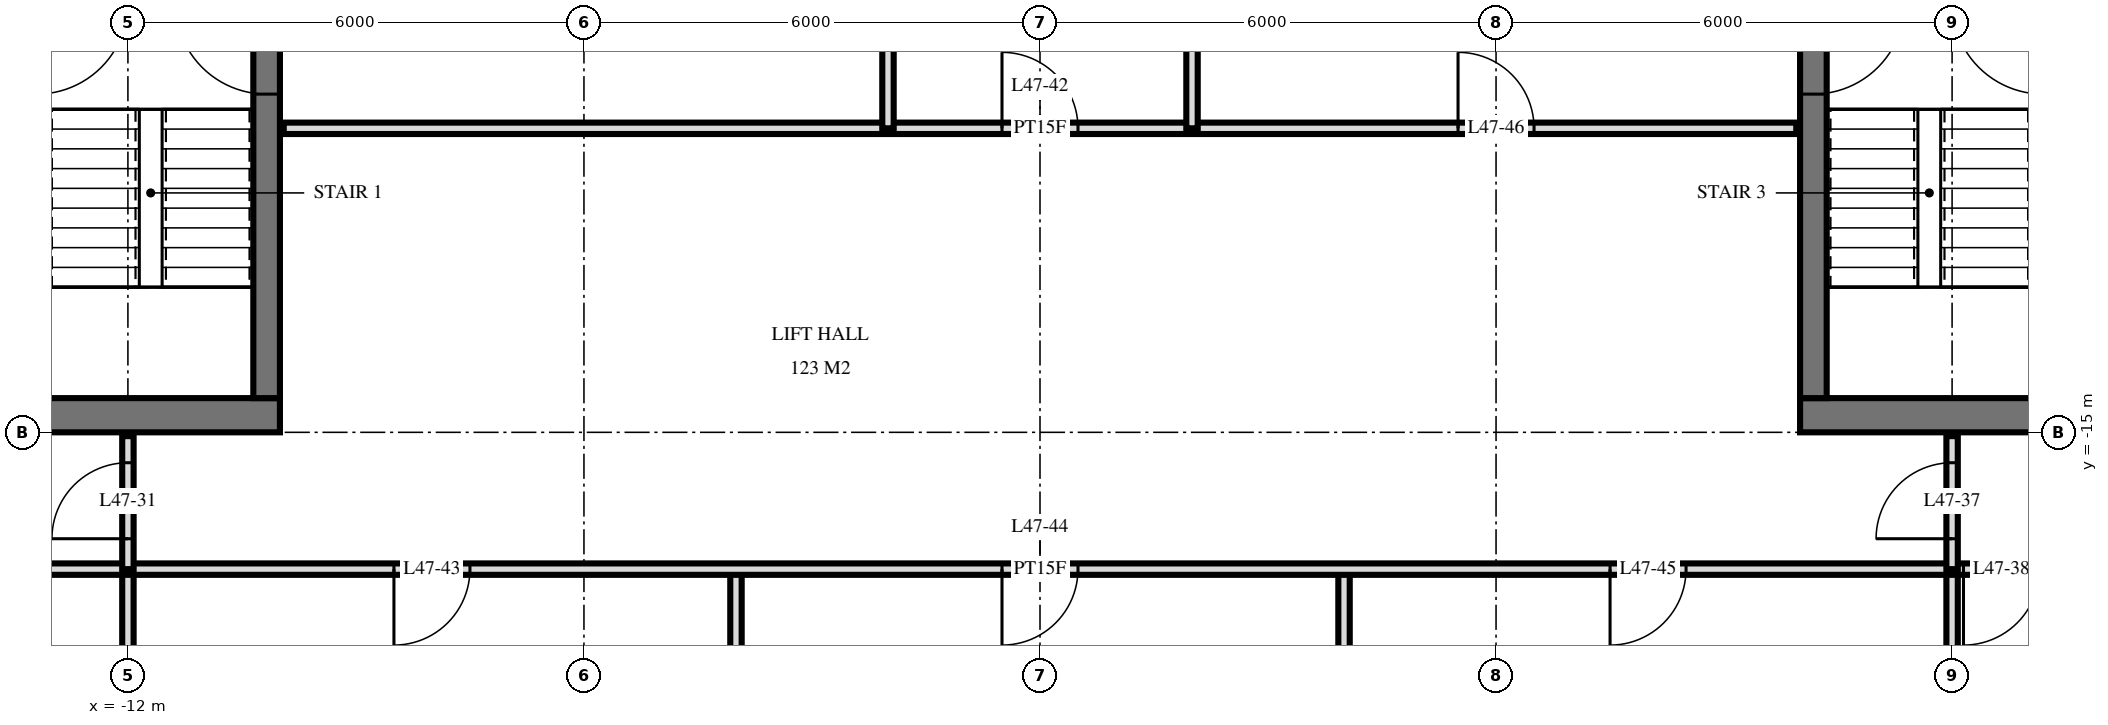
"""IFC4 building model, lengths in metres.
Left out: names, types, materials, properties, quantities, classifications, styles, units other than length and angle.
Written with IfcOpenShell. Run it as: python <this file> out.ifc"""

import sys

from ifc_helpers import new_model, si_unit, direction, frame, frame_2d, origin, place, context, subcontext, project, spatial, rectangle, extrude, element, fill, save


model = new_model("IFC4")
c1 = context("Model", 3, precision=1e-05, world=origin(), true_north=direction((0.0, 1.0)))
c2 = subcontext(c1, "Body", "Model", "MODEL_VIEW")
j1 = project(units=[si_unit("LENGTHUNIT", "METRE"), si_unit("PLANEANGLEUNIT", "RADIAN")], contexts=[c1])
p1 = place(None, origin())
s1 = spatial("IfcSite", under=j1, at=p1, CompositionType="ELEMENT")
p2 = place(p1, origin())
s2 = spatial("IfcBuilding", under=s1, at=p2, CompositionType="ELEMENT")
p3 = place(p2, frame((0.0, 0.0, 183.6)))
s3 = spatial("IfcBuildingStorey", under=s2, at=p3, CompositionType="ELEMENT", Elevation=183.6)
p4 = place(p3, frame((-24.5, -14.775, 0.0), z_axis=(0.0, 0.0, 1.0), x_axis=(1.0, 0.0, 0.0)))
e1 = element("IfcWall", 1, at=p4, inside=s3, PredefinedType="SHEAR", context=c2, shape_type="SweptSolid", body=[
    extrude(rectangle(XDim=14.5, YDim=0.45, at=frame_2d((7.25, 0.0))), origin(), (0.0, 0.0, 1.0), 3.5),
])
p5 = place(p4, frame((6.2, 0.0, 0.0)))
e2 = element("IfcOpeningElement", 2, at=p5, cuts=e1, PredefinedType="OPENING", context=c2, shape_type="SweptSolid", body=[
    extrude(rectangle(XDim=1.2, YDim=2.1, at=frame_2d((0.6, 1.05))), frame((0.0, 0.235, 0.0), z_axis=(0.0, -1.0, 0.0), x_axis=(1.0, 0.0, 0.0)), (0.0, 0.0, 1.0), 0.47),
])
p6 = place(p4, frame((9.25, 0.0, 0.0)))
e3 = element("IfcOpeningElement", 3, at=p6, cuts=e1, PredefinedType="OPENING", context=c2, shape_type="SweptSolid", body=[
    extrude(rectangle(XDim=1.1, YDim=2.1, at=frame_2d((0.55, 1.05))), frame((0.0, 0.235, 0.0), z_axis=(0.0, -1.0, 0.0), x_axis=(1.0, 0.0, 0.0)), (0.0, 0.0, 1.0), 0.47),
])
p7 = place(p4, frame((3.5, 0.0, 0.0)))
e4 = element("IfcOpeningElement", 4, at=p7, cuts=e1, PredefinedType="OPENING", context=c2, shape_type="SweptSolid", body=[
    extrude(rectangle(XDim=0.9, YDim=2.1, at=frame_2d((0.45, 1.05))), frame((0.0, 0.235, 0.0), z_axis=(0.0, -1.0, 0.0), x_axis=(1.0, 0.0, 0.0)), (0.0, 0.0, 1.0), 0.47),
])
p8 = place(p4, frame((1.05, 0.0, 0.0)))
e5 = element("IfcOpeningElement", 5, at=p8, cuts=e1, PredefinedType="OPENING", context=c2, shape_type="SweptSolid", body=[
    extrude(rectangle(XDim=1.0, YDim=2.1, at=frame_2d((0.5, 1.05))), frame((0.0, 0.235, 0.0), z_axis=(0.0, -1.0, 0.0), x_axis=(1.0, 0.0, 0.0)), (0.0, 0.0, 1.0), 0.47),
])
p9 = place(p3, frame((-10.175, -14.55, 0.0), z_axis=(0.0, 0.0, 1.0), x_axis=(0.0, 1.0, 0.0)))
e6 = element("IfcWall", 6, at=p9, inside=s3, PredefinedType="SHEAR", context=c2, shape_type="SweptSolid", body=[
    extrude(rectangle(XDim=14.1, YDim=0.35, at=frame_2d((7.05, 0.0))), origin(), (0.0, 0.0, 1.0), 3.5),
])
p10 = place(p9, frame((8.4, 0.0, 0.0)))
e7 = element("IfcOpeningElement", 7, at=p10, cuts=e6, PredefinedType="OPENING", context=c2, shape_type="SweptSolid", body=[
    extrude(rectangle(XDim=1.4, YDim=2.4, at=frame_2d((0.7, 1.2))), frame((0.0, 0.185, 0.0), z_axis=(0.0, -1.0, 0.0), x_axis=(1.0, 0.0, 0.0)), (0.0, 0.0, 1.0), 0.37),
])
p11 = place(p9, frame((10.0, 0.0, 0.0)))
e8 = element("IfcOpeningElement", 8, at=p11, cuts=e6, PredefinedType="OPENING", context=c2, shape_type="SweptSolid", body=[
    extrude(rectangle(XDim=1.4, YDim=2.4, at=frame_2d((0.7, 1.2))), frame((0.0, 0.185, 0.0), z_axis=(0.0, -1.0, 0.0), x_axis=(1.0, 0.0, 0.0)), (0.0, 0.0, 1.0), 0.37),
])
p12 = place(p9, frame((4.0, 0.0, 0.0)))
e9 = element("IfcOpeningElement", 9, at=p12, cuts=e6, PredefinedType="OPENING", context=c2, shape_type="SweptSolid", body=[
    extrude(rectangle(XDim=1.2, YDim=2.1, at=frame_2d((0.6, 1.05))), frame((0.0, 0.185, 0.0), z_axis=(0.0, -1.0, 0.0), x_axis=(1.0, 0.0, 0.0)), (0.0, 0.0, 1.0), 0.37),
])
p13 = place(p3, frame((10.0, -14.775, 0.0), z_axis=(0.0, 0.0, 1.0), x_axis=(1.0, 0.0, 0.0)))
e10 = element("IfcWall", 10, at=p13, inside=s3, PredefinedType="SHEAR", context=c2, shape_type="SweptSolid", body=[
    extrude(rectangle(XDim=14.5, YDim=0.45, at=frame_2d((7.25, 0.0))), origin(), (0.0, 0.0, 1.0), 3.5),
])
p14 = place(p13, frame((7.1, 0.0, 0.0)))
e11 = element("IfcOpeningElement", 11, at=p14, cuts=e10, PredefinedType="OPENING", context=c2, shape_type="SweptSolid", body=[
    extrude(rectangle(XDim=1.2, YDim=2.1, at=frame_2d((0.6, 1.05))), frame((0.0, 0.235, 0.0), z_axis=(0.0, -1.0, 0.0), x_axis=(1.0, 0.0, 0.0)), (0.0, 0.0, 1.0), 0.47),
])
p15 = place(p13, frame((4.15, 0.0, 0.0)))
e12 = element("IfcOpeningElement", 12, at=p15, cuts=e10, PredefinedType="OPENING", context=c2, shape_type="SweptSolid", body=[
    extrude(rectangle(XDim=1.1, YDim=2.1, at=frame_2d((0.55, 1.05))), frame((0.0, 0.235, 0.0), z_axis=(0.0, -1.0, 0.0), x_axis=(1.0, 0.0, 0.0)), (0.0, 0.0, 1.0), 0.47),
])
p16 = place(p13, frame((10.1, 0.0, 0.0)))
e13 = element("IfcOpeningElement", 13, at=p16, cuts=e10, PredefinedType="OPENING", context=c2, shape_type="SweptSolid", body=[
    extrude(rectangle(XDim=0.9, YDim=2.1, at=frame_2d((0.45, 1.05))), frame((0.0, 0.235, 0.0), z_axis=(0.0, -1.0, 0.0), x_axis=(1.0, 0.0, 0.0)), (0.0, 0.0, 1.0), 0.47),
])
p17 = place(p13, frame((12.45, 0.0, 0.0)))
e14 = element("IfcOpeningElement", 14, at=p17, cuts=e10, PredefinedType="OPENING", context=c2, shape_type="SweptSolid", body=[
    extrude(rectangle(XDim=1.0, YDim=2.1, at=frame_2d((0.5, 1.05))), frame((0.0, 0.235, 0.0), z_axis=(0.0, -1.0, 0.0), x_axis=(1.0, 0.0, 0.0)), (0.0, 0.0, 1.0), 0.47),
])
p18 = place(p3, frame((10.175, -14.55, 0.0), z_axis=(0.0, 0.0, 1.0), x_axis=(0.0, 1.0, 0.0)))
e15 = element("IfcWall", 15, at=p18, inside=s3, PredefinedType="SHEAR", context=c2, shape_type="SweptSolid", body=[
    extrude(rectangle(XDim=14.1, YDim=0.35, at=frame_2d((7.05, 0.0))), origin(), (0.0, 0.0, 1.0), 3.5),
])
p19 = place(p18, frame((8.4, 0.0, 0.0)))
e16 = element("IfcOpeningElement", 16, at=p19, cuts=e15, PredefinedType="OPENING", context=c2, shape_type="SweptSolid", body=[
    extrude(rectangle(XDim=1.4, YDim=2.4, at=frame_2d((0.7, 1.2))), frame((0.0, 0.185, 0.0), z_axis=(0.0, -1.0, 0.0), x_axis=(1.0, 0.0, 0.0)), (0.0, 0.0, 1.0), 0.37),
])
p20 = place(p18, frame((10.0, 0.0, 0.0)))
e17 = element("IfcOpeningElement", 17, at=p20, cuts=e15, PredefinedType="OPENING", context=c2, shape_type="SweptSolid", body=[
    extrude(rectangle(XDim=1.4, YDim=2.4, at=frame_2d((0.7, 1.2))), frame((0.0, 0.185, 0.0), z_axis=(0.0, -1.0, 0.0), x_axis=(1.0, 0.0, 0.0)), (0.0, 0.0, 1.0), 0.37),
])
p21 = place(p18, frame((4.0, 0.0, 0.0)))
e18 = element("IfcOpeningElement", 18, at=p21, cuts=e15, PredefinedType="OPENING", context=c2, shape_type="SweptSolid", body=[
    extrude(rectangle(XDim=1.2, YDim=2.1, at=frame_2d((0.6, 1.05))), frame((0.0, 0.185, 0.0), z_axis=(0.0, -1.0, 0.0), x_axis=(1.0, 0.0, 0.0)), (0.0, 0.0, 1.0), 0.37),
])
p22 = place(p3, frame((12.0, -16.8, 0.0), z_axis=(0.0, 0.0, 1.0), x_axis=(0.0, 1.0, 0.0)))
e19 = element("IfcWall", 19, at=p22, inside=s3, PredefinedType="PARTITIONING", context=c2, shape_type="SweptSolid", body=[
    extrude(rectangle(XDim=1.75, YDim=0.15, at=frame_2d((0.875, 0.0))), origin(), (0.0, 0.0, 1.0), 3.22),
])
p23 = place(p22, frame((0.4, 0.0, 0.0)))
e20 = element("IfcOpeningElement", 20, at=p23, cuts=e19, PredefinedType="OPENING", context=c2, shape_type="SweptSolid", body=[
    extrude(rectangle(XDim=1.0, YDim=2.1, at=frame_2d((0.5, 1.05))), frame((0.0, 0.085, 0.0), z_axis=(0.0, -1.0, 0.0), x_axis=(1.0, 0.0, 0.0)), (0.0, 0.0, 1.0), 0.17),
])
for number, where, z_axis, x_axis in (
    (21, (12.0, -29.22, 0.0), (0.0, 0.0, 1.0), (0.0, 1.0, 0.0)),
    (22, (4.0, -29.22, 0.0), (0.0, 0.0, 1.0), (0.0, 1.0, 0.0)),
):
    element("IfcWall", number, at=place(p3, frame(where, z_axis=z_axis, x_axis=x_axis)), inside=s3, PredefinedType="PARTITIONING", context=c2, shape_type="SweptSolid", body=[
        extrude(rectangle(XDim=12.42, YDim=0.15, at=frame_2d((6.21, 0.0))), origin(), (0.0, 0.0, 1.0), 3.22),
    ])
for number, where, z_axis, x_axis in (
    (23, (2.0, -11.0, 0.0), (0.0, 0.0, 1.0), (0.0, 1.0, 0.0)),
    (24, (-2.0, -11.0, 0.0), (0.0, 0.0, 1.0), (0.0, 1.0, 0.0)),
):
    element("IfcWall", number, at=place(p3, frame(where, z_axis=z_axis, x_axis=x_axis)), inside=s3, PredefinedType="PARTITIONING", context=c2, shape_type="SweptSolid", body=[
        extrude(rectangle(XDim=4.0, YDim=0.15, at=frame_2d((2.0, 0.0))), origin(), (0.0, 0.0, 1.0), 3.22),
    ])
p24 = place(p3, frame((-4.0, -29.22, 0.0), z_axis=(0.0, 0.0, 1.0), x_axis=(0.0, 1.0, 0.0)))
e25 = element("IfcWall", 25, at=p24, inside=s3, PredefinedType="PARTITIONING", context=c2, shape_type="SweptSolid", body=[
    extrude(rectangle(XDim=12.42, YDim=0.15, at=frame_2d((6.21, 0.0))), origin(), (0.0, 0.0, 1.0), 3.22),
])
p25 = place(p3, frame((-12.0, -16.8, 0.0), z_axis=(0.0, 0.0, 1.0), x_axis=(0.0, 1.0, 0.0)))
e26 = element("IfcWall", 26, at=p25, inside=s3, PredefinedType="PARTITIONING", context=c2, shape_type="SweptSolid", body=[
    extrude(rectangle(XDim=1.75, YDim=0.15, at=frame_2d((0.875, 0.0))), origin(), (0.0, 0.0, 1.0), 3.22),
])
p26 = place(p25, frame((0.4, 0.0, 0.0)))
e27 = element("IfcOpeningElement", 27, at=p26, cuts=e26, PredefinedType="OPENING", context=c2, shape_type="SweptSolid", body=[
    extrude(rectangle(XDim=1.0, YDim=2.1, at=frame_2d((0.5, 1.05))), frame((0.0, 0.085, 0.0), z_axis=(0.0, -1.0, 0.0), x_axis=(1.0, 0.0, 0.0)), (0.0, 0.0, 1.0), 0.17),
])
p27 = place(p3, frame((-12.0, -29.22, 0.0), z_axis=(0.0, 0.0, 1.0), x_axis=(0.0, 1.0, 0.0)))
e28 = element("IfcWall", 28, at=p27, inside=s3, PredefinedType="PARTITIONING", context=c2, shape_type="SweptSolid", body=[
    extrude(rectangle(XDim=12.42, YDim=0.15, at=frame_2d((6.21, 0.0))), origin(), (0.0, 0.0, 1.0), 3.22),
])
p28 = place(p3, frame((-26.82, -16.8, 0.0), z_axis=(0.0, 0.0, 1.0), x_axis=(1.0, 0.0, 0.0)))
e29 = element("IfcWall", 29, at=p28, inside=s3, PredefinedType="PARTITIONING", context=c2, shape_type="SweptSolid", body=[
    extrude(rectangle(XDim=53.64, YDim=0.15, at=frame_2d((26.82, 0.0))), origin(), (0.0, 0.0, 1.0), 3.22),
])
p29 = place(p28, frame((11.97, 0.0, 0.0)))
e30 = element("IfcOpeningElement", 30, at=p29, cuts=e29, PredefinedType="OPENING", context=c2, shape_type="SweptSolid", body=[
    extrude(rectangle(XDim=1.0, YDim=2.1, at=frame_2d((0.5, 1.05))), frame((0.0, 0.085, 0.0), z_axis=(0.0, -1.0, 0.0), x_axis=(1.0, 0.0, 0.0)), (0.0, 0.0, 1.0), 0.17),
])
p30 = place(p28, frame((10.67, 0.0, 0.0)))
e31 = element("IfcOpeningElement", 31, at=p30, cuts=e29, PredefinedType="OPENING", context=c2, shape_type="SweptSolid", body=[
    extrude(rectangle(XDim=1.0, YDim=2.1, at=frame_2d((0.5, 1.05))), frame((0.0, 0.085, 0.0), z_axis=(0.0, -1.0, 0.0), x_axis=(1.0, 0.0, 0.0)), (0.0, 0.0, 1.0), 0.17),
])
p31 = place(p28, frame((3.22, 0.0, 0.0)))
e32 = element("IfcOpeningElement", 32, at=p31, cuts=e29, PredefinedType="OPENING", context=c2, shape_type="SweptSolid", body=[
    extrude(rectangle(XDim=1.0, YDim=2.1, at=frame_2d((0.5, 1.05))), frame((0.0, 0.085, 0.0), z_axis=(0.0, -1.0, 0.0), x_axis=(1.0, 0.0, 0.0)), (0.0, 0.0, 1.0), 0.17),
])
p32 = place(p28, frame((5.02, 0.0, 0.0)))
e33 = element("IfcOpeningElement", 33, at=p32, cuts=e29, PredefinedType="OPENING", context=c2, shape_type="SweptSolid", body=[
    extrude(rectangle(XDim=1.0, YDim=2.1, at=frame_2d((0.5, 1.05))), frame((0.0, 0.085, 0.0), z_axis=(0.0, -1.0, 0.0), x_axis=(1.0, 0.0, 0.0)), (0.0, 0.0, 1.0), 0.17),
])
p33 = place(p28, frame((38.97, 0.0, 0.0)))
e34 = element("IfcOpeningElement", 34, at=p33, cuts=e29, PredefinedType="OPENING", context=c2, shape_type="SweptSolid", body=[
    extrude(rectangle(XDim=1.0, YDim=2.1, at=frame_2d((0.5, 1.05))), frame((0.0, 0.085, 0.0), z_axis=(0.0, -1.0, 0.0), x_axis=(1.0, 0.0, 0.0)), (0.0, 0.0, 1.0), 0.17),
])
p34 = place(p28, frame((48.72, 0.0, 0.0)))
e35 = element("IfcOpeningElement", 35, at=p34, cuts=e29, PredefinedType="OPENING", context=c2, shape_type="SweptSolid", body=[
    extrude(rectangle(XDim=1.0, YDim=2.1, at=frame_2d((0.5, 1.05))), frame((0.0, 0.085, 0.0), z_axis=(0.0, -1.0, 0.0), x_axis=(1.0, 0.0, 0.0)), (0.0, 0.0, 1.0), 0.17),
])
p35 = place(p28, frame((46.92, 0.0, 0.0)))
e36 = element("IfcOpeningElement", 36, at=p35, cuts=e29, PredefinedType="OPENING", context=c2, shape_type="SweptSolid", body=[
    extrude(rectangle(XDim=1.0, YDim=2.1, at=frame_2d((0.5, 1.05))), frame((0.0, 0.085, 0.0), z_axis=(0.0, -1.0, 0.0), x_axis=(1.0, 0.0, 0.0)), (0.0, 0.0, 1.0), 0.17),
])
p36 = place(p28, frame((18.32, 0.0, 0.0)))
e37 = element("IfcOpeningElement", 37, at=p36, cuts=e29, PredefinedType="OPENING", context=c2, shape_type="SweptSolid", body=[
    extrude(rectangle(XDim=1.0, YDim=2.1, at=frame_2d((0.5, 1.05))), frame((0.0, 0.085, 0.0), z_axis=(0.0, -1.0, 0.0), x_axis=(1.0, 0.0, 0.0)), (0.0, 0.0, 1.0), 0.17),
])
p37 = place(p28, frame((26.32, 0.0, 0.0)))
e38 = element("IfcOpeningElement", 38, at=p37, cuts=e29, PredefinedType="OPENING", context=c2, shape_type="SweptSolid", body=[
    extrude(rectangle(XDim=1.0, YDim=2.1, at=frame_2d((0.5, 1.05))), frame((0.0, 0.085, 0.0), z_axis=(0.0, -1.0, 0.0), x_axis=(1.0, 0.0, 0.0)), (0.0, 0.0, 1.0), 0.17),
])
p38 = place(p28, frame((34.32, 0.0, 0.0)))
e39 = element("IfcOpeningElement", 39, at=p38, cuts=e29, PredefinedType="OPENING", context=c2, shape_type="SweptSolid", body=[
    extrude(rectangle(XDim=1.0, YDim=2.1, at=frame_2d((0.5, 1.05))), frame((0.0, 0.085, 0.0), z_axis=(0.0, -1.0, 0.0), x_axis=(1.0, 0.0, 0.0)), (0.0, 0.0, 1.0), 0.17),
])
p39 = place(p3, frame((-9.95, -11.0, 0.0), z_axis=(0.0, 0.0, 1.0), x_axis=(1.0, 0.0, 0.0)))
e40 = element("IfcWall", 40, at=p39, inside=s3, PredefinedType="PARTITIONING", context=c2, shape_type="SweptSolid", body=[
    extrude(rectangle(XDim=19.9, YDim=0.15, at=frame_2d((9.95, 0.0))), origin(), (0.0, 0.0, 1.0), 3.22),
])
p40 = place(p39, frame((9.45, 0.0, 0.0)))
e41 = element("IfcOpeningElement", 41, at=p40, cuts=e40, PredefinedType="OPENING", context=c2, shape_type="SweptSolid", body=[
    extrude(rectangle(XDim=1.0, YDim=2.1, at=frame_2d((0.5, 1.05))), frame((0.0, 0.085, 0.0), z_axis=(0.0, -1.0, 0.0), x_axis=(1.0, 0.0, 0.0)), (0.0, 0.0, 1.0), 0.17),
])
p41 = place(p39, frame((15.45, 0.0, 0.0)))
e42 = element("IfcOpeningElement", 42, at=p41, cuts=e40, PredefinedType="OPENING", context=c2, shape_type="SweptSolid", body=[
    extrude(rectangle(XDim=1.0, YDim=2.1, at=frame_2d((0.5, 1.05))), frame((0.0, 0.085, 0.0), z_axis=(0.0, -1.0, 0.0), x_axis=(1.0, 0.0, 0.0)), (0.0, 0.0, 1.0), 0.17),
])
p42 = place(p12, origin())
e43 = element("IfcDoor", 43, at=p42, inside=s3, OperationType="SINGLE_SWING_LEFT", PredefinedType="DOOR", context=c2, shape_type="SweptSolid", body=[
    extrude(rectangle(XDim=1.2, YDim=2.1, at=frame_2d((0.6, 1.05))), frame((0.0, 0.025, 0.0), z_axis=(0.0, -1.0, 0.0), x_axis=(1.0, 0.0, 0.0)), (0.0, 0.0, 1.0), 0.05),
])
fill(e9, e43)
p43 = place(p21, frame((0.6, 0.0, 0.0), z_axis=(0.0, 0.0, 1.0), x_axis=(-1.0, 0.0, 0.0)))
e44 = element("IfcDoor", 44, at=p43, inside=s3, OperationType="SINGLE_SWING_RIGHT", PredefinedType="DOOR", context=c2, shape_type="SweptSolid", body=[
    extrude(rectangle(XDim=1.2, YDim=2.1, at=frame_2d((0.0, 1.05))), frame((0.0, -0.025, 0.0), z_axis=(0.0, 1.0, 0.0), x_axis=(-1.0, 0.0, 0.0)), (0.0, 0.0, 1.0), 0.05),
])
fill(e18, e44)
p44 = place(p26, origin())
e45 = element("IfcDoor", 45, at=p44, inside=s3, OperationType="SINGLE_SWING_RIGHT", PredefinedType="DOOR", context=c2, shape_type="SweptSolid", body=[
    extrude(rectangle(XDim=1.0, YDim=2.1, at=frame_2d((0.5, 1.05))), frame((0.0, 0.025, 0.0), z_axis=(0.0, -1.0, 0.0), x_axis=(1.0, 0.0, 0.0)), (0.0, 0.0, 1.0), 0.05),
])
fill(e27, e45)
p45 = place(p23, origin())
e46 = element("IfcDoor", 46, at=p45, inside=s3, OperationType="SINGLE_SWING_RIGHT", PredefinedType="DOOR", context=c2, shape_type="SweptSolid", body=[
    extrude(rectangle(XDim=1.0, YDim=2.1, at=frame_2d((0.5, 1.05))), frame((0.0, 0.025, 0.0), z_axis=(0.0, -1.0, 0.0), x_axis=(1.0, 0.0, 0.0)), (0.0, 0.0, 1.0), 0.05),
])
fill(e20, e46)
p46 = place(p33, frame((0.5, 0.0, 0.0), z_axis=(0.0, 0.0, 1.0), x_axis=(-1.0, 0.0, 0.0)))
e47 = element("IfcDoor", 47, at=p46, inside=s3, OperationType="SINGLE_SWING_LEFT", PredefinedType="DOOR", context=c2, shape_type="SweptSolid", body=[
    extrude(rectangle(XDim=1.0, YDim=2.1, at=frame_2d((0.0, 1.05))), frame((0.0, -0.025, 0.0), z_axis=(0.0, 1.0, 0.0), x_axis=(-1.0, 0.0, 0.0)), (0.0, 0.0, 1.0), 0.05),
])
fill(e34, e47)
p47 = place(p40, origin())
e48 = element("IfcDoor", 48, at=p47, inside=s3, OperationType="SINGLE_SWING_RIGHT", PredefinedType="DOOR", context=c2, shape_type="SweptSolid", body=[
    extrude(rectangle(XDim=1.0, YDim=2.1, at=frame_2d((0.5, 1.05))), frame((0.0, 0.025, 0.0), z_axis=(0.0, -1.0, 0.0), x_axis=(1.0, 0.0, 0.0)), (0.0, 0.0, 1.0), 0.05),
])
fill(e41, e48)
p48 = place(p36, frame((0.5, 0.0, 0.0), z_axis=(0.0, 0.0, 1.0), x_axis=(-1.0, 0.0, 0.0)))
e49 = element("IfcDoor", 49, at=p48, inside=s3, OperationType="SINGLE_SWING_LEFT", PredefinedType="DOOR", context=c2, shape_type="SweptSolid", body=[
    extrude(rectangle(XDim=1.0, YDim=2.1, at=frame_2d((0.0, 1.05))), frame((0.0, -0.025, 0.0), z_axis=(0.0, 1.0, 0.0), x_axis=(-1.0, 0.0, 0.0)), (0.0, 0.0, 1.0), 0.05),
])
fill(e37, e49)
p49 = place(p37, frame((0.5, 0.0, 0.0), z_axis=(0.0, 0.0, 1.0), x_axis=(-1.0, 0.0, 0.0)))
e50 = element("IfcDoor", 50, at=p49, inside=s3, OperationType="SINGLE_SWING_LEFT", PredefinedType="DOOR", context=c2, shape_type="SweptSolid", body=[
    extrude(rectangle(XDim=1.0, YDim=2.1, at=frame_2d((0.0, 1.05))), frame((0.0, -0.025, 0.0), z_axis=(0.0, 1.0, 0.0), x_axis=(-1.0, 0.0, 0.0)), (0.0, 0.0, 1.0), 0.05),
])
fill(e38, e50)
p50 = place(p38, frame((0.5, 0.0, 0.0), z_axis=(0.0, 0.0, 1.0), x_axis=(-1.0, 0.0, 0.0)))
e51 = element("IfcDoor", 51, at=p50, inside=s3, OperationType="SINGLE_SWING_LEFT", PredefinedType="DOOR", context=c2, shape_type="SweptSolid", body=[
    extrude(rectangle(XDim=1.0, YDim=2.1, at=frame_2d((0.0, 1.05))), frame((0.0, -0.025, 0.0), z_axis=(0.0, 1.0, 0.0), x_axis=(-1.0, 0.0, 0.0)), (0.0, 0.0, 1.0), 0.05),
])
fill(e39, e51)
p51 = place(p41, origin())
e52 = element("IfcDoor", 52, at=p51, inside=s3, OperationType="SINGLE_SWING_RIGHT", PredefinedType="DOOR", context=c2, shape_type="SweptSolid", body=[
    extrude(rectangle(XDim=1.0, YDim=2.1, at=frame_2d((0.5, 1.05))), frame((0.0, 0.025, 0.0), z_axis=(0.0, -1.0, 0.0), x_axis=(1.0, 0.0, 0.0)), (0.0, 0.0, 1.0), 0.05),
])
fill(e42, e52)
save(model, sys.argv[1])
